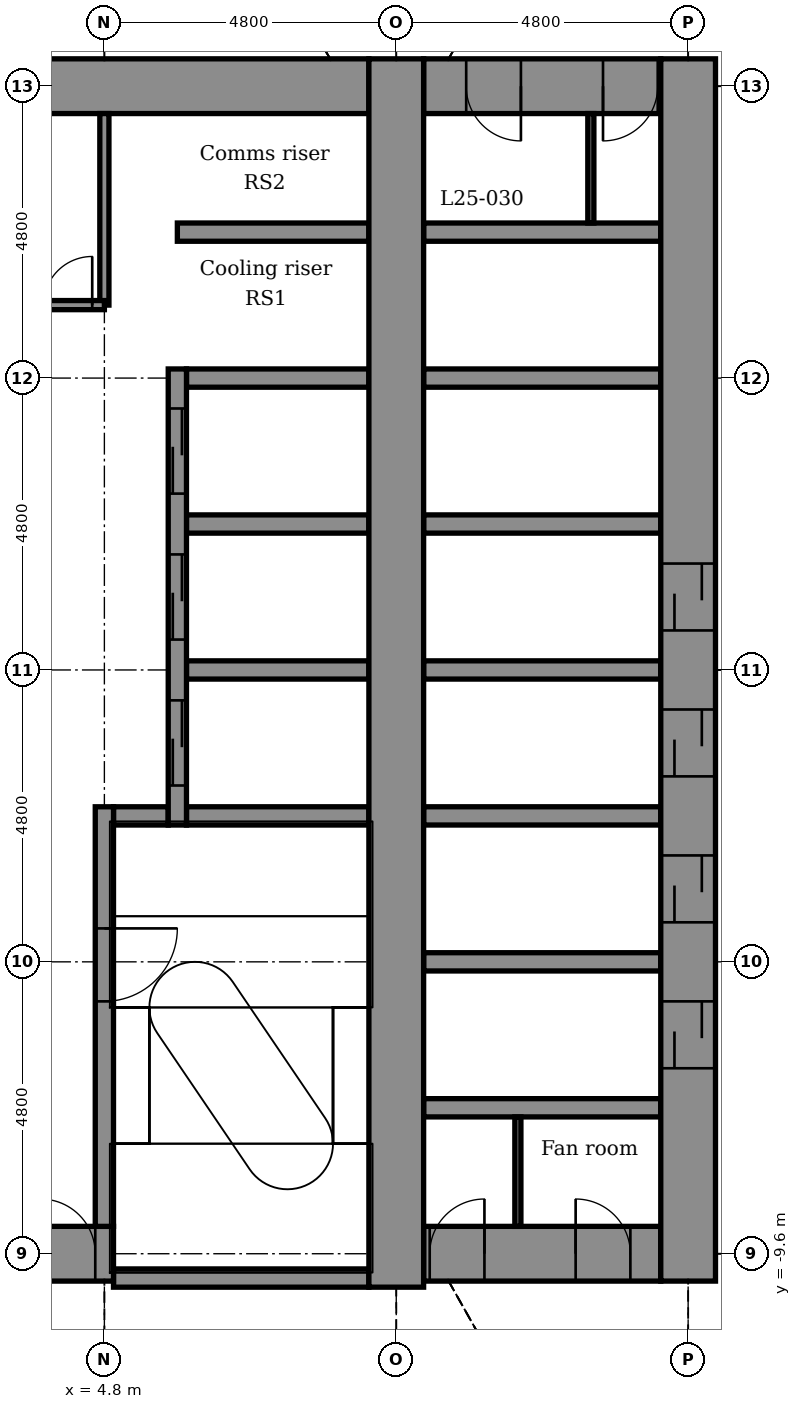
"""IFC4 building model, lengths in metres.
Left out: names, types, materials, properties, quantities, classifications, styles, units other than length and angle.
Written with IfcOpenShell. Run it as: python <this file> out.ifc"""

import sys

from ifc_helpers import new_model, si_unit, direction, frame, frame_2d, origin, place, context, subcontext, project, spatial, rectangle, extrude, element, fill, save


model = new_model("IFC4")
c1 = context("Model", 3, precision=1e-05, world=origin(), true_north=direction((0.0, 1.0)))
c2 = subcontext(c1, "Body", "Model", "MODEL_VIEW")
j1 = project(units=[si_unit("LENGTHUNIT", "METRE"), si_unit("PLANEANGLEUNIT", "RADIAN")], contexts=[c1])
p1 = place(None, origin())
s1 = spatial("IfcSite", under=j1, at=p1, CompositionType="ELEMENT")
p2 = place(p1, origin())
s2 = spatial("IfcBuilding", under=s1, at=p2, CompositionType="ELEMENT")
p3 = place(p2, frame((0.0, 0.0, 127.4)))
s3 = spatial("IfcBuildingStorey", under=s2, at=p3, CompositionType="ELEMENT", Elevation=127.4)
p4 = place(p3, frame((4.95, -10.0, -0.3), z_axis=(0.0, 0.0, 1.0), x_axis=(1.0, 0.0, 0.0)))
e1 = element("IfcWall", 1, at=p4, inside=s3, PredefinedType="STANDARD", context=c2, shape_type="SweptSolid", body=[
    extrude(rectangle(XDim=4.2, YDim=0.3, at=frame_2d((2.1, 0.0))), origin(), (0.0, 0.0, 1.0), 6.15),
])
p5 = place(p3, frame((-5.25, -9.6, -0.3), z_axis=(0.0, 0.0, 1.0), x_axis=(1.0, 0.0, 0.0)))
e2 = element("IfcWall", 2, at=p5, inside=s3, PredefinedType="SHEAR", context=c2, shape_type="SweptSolid", body=[
    extrude(rectangle(XDim=10.2, YDim=0.9, at=frame_2d((5.1, 0.0))), origin(), (0.0, 0.0, 1.0), 6.15),
])
p6 = place(p5, frame((9.0, 0.0, 0.3)))
e3 = element("IfcOpeningElement", 3, at=p6, cuts=e2, PredefinedType="OPENING", context=c2, shape_type="SweptSolid", body=[
    extrude(rectangle(XDim=0.9, YDim=2.1, at=frame_2d((0.45, 1.05))), frame((0.0, 0.46, 0.0), z_axis=(0.0, -1.0, 0.0), x_axis=(1.0, 0.0, 0.0)), (0.0, 0.0, 1.0), 0.92),
])
p7 = place(p3, frame((10.05, -9.6, -0.3), z_axis=(0.0, 0.0, 1.0), x_axis=(1.0, 0.0, 0.0)))
e4 = element("IfcWall", 4, at=p7, inside=s3, PredefinedType="SHEAR", context=c2, shape_type="SweptSolid", body=[
    extrude(rectangle(XDim=3.9, YDim=0.9, at=frame_2d((1.95, 0.0))), origin(), (0.0, 0.0, 1.0), 6.15),
])
p8 = place(p7, frame((0.1, 0.0, 0.3)))
e5 = element("IfcOpeningElement", 5, at=p8, cuts=e4, PredefinedType="OPENING", context=c2, shape_type="SweptSolid", body=[
    extrude(rectangle(XDim=0.9, YDim=2.1, at=frame_2d((0.45, 1.05))), frame((0.0, 0.46, 0.0), z_axis=(0.0, -1.0, 0.0), x_axis=(1.0, 0.0, 0.0)), (0.0, 0.0, 1.0), 0.92),
])
p9 = place(p7, frame((2.5, 0.0, 0.3)))
e6 = element("IfcOpeningElement", 6, at=p9, cuts=e4, PredefinedType="OPENING", context=c2, shape_type="SweptSolid", body=[
    extrude(rectangle(XDim=0.9, YDim=2.1, at=frame_2d((0.45, 1.05))), frame((0.0, 0.46, 0.0), z_axis=(0.0, -1.0, 0.0), x_axis=(1.0, 0.0, 0.0)), (0.0, 0.0, 1.0), 0.92),
])
p10 = place(p3, frame((10.05, -7.2, -0.3), z_axis=(0.0, 0.0, 1.0), x_axis=(1.0, 0.0, 0.0)))
e7 = element("IfcWall", 7, at=p10, inside=s3, PredefinedType="STANDARD", context=c2, shape_type="SweptSolid", body=[
    extrude(rectangle(XDim=3.9, YDim=0.3, at=frame_2d((1.95, 0.0))), origin(), (0.0, 0.0, 1.0), 6.15),
])
p11 = place(p3, frame((10.05, -4.8, -0.3), z_axis=(0.0, 0.0, 1.0), x_axis=(1.0, 0.0, 0.0)))
e8 = element("IfcWall", 8, at=p11, inside=s3, PredefinedType="STANDARD", context=c2, shape_type="SweptSolid", body=[
    extrude(rectangle(XDim=3.9, YDim=0.3, at=frame_2d((1.95, 0.0))), origin(), (0.0, 0.0, 1.0), 4.7),
])
p12 = place(p3, frame((4.95, -2.4, -0.3), z_axis=(0.0, 0.0, 1.0), x_axis=(1.0, 0.0, 0.0)))
e9 = element("IfcWall", 9, at=p12, inside=s3, PredefinedType="STANDARD", context=c2, shape_type="SweptSolid", body=[
    extrude(rectangle(XDim=0.9, YDim=0.3, at=frame_2d((0.45, 0.0))), origin(), (0.0, 0.0, 1.0), 6.15),
])
p13 = place(p3, frame((6.15, -2.4, -0.3), z_axis=(0.0, 0.0, 1.0), x_axis=(1.0, 0.0, 0.0)))
e10 = element("IfcWall", 10, at=p13, inside=s3, PredefinedType="STANDARD", context=c2, shape_type="SweptSolid", body=[
    extrude(rectangle(XDim=3.0, YDim=0.3, at=frame_2d((1.5, 0.0))), origin(), (0.0, 0.0, 1.0), 6.15),
])
p14 = place(p3, frame((10.05, -2.4, -0.3), z_axis=(0.0, 0.0, 1.0), x_axis=(1.0, 0.0, 0.0)))
e11 = element("IfcWall", 11, at=p14, inside=s3, PredefinedType="STANDARD", context=c2, shape_type="SweptSolid", body=[
    extrude(rectangle(XDim=3.9, YDim=0.3, at=frame_2d((1.95, 0.0))), origin(), (0.0, 0.0, 1.0), 4.7),
])
p15 = place(p3, frame((6.15, 0.0, -0.3), z_axis=(0.0, 0.0, 1.0), x_axis=(1.0, 0.0, 0.0)))
e12 = element("IfcWall", 12, at=p15, inside=s3, PredefinedType="STANDARD", context=c2, shape_type="SweptSolid", body=[
    extrude(rectangle(XDim=3.0, YDim=0.3, at=frame_2d((1.5, 0.0))), origin(), (0.0, 0.0, 1.0), 6.15),
])
p16 = place(p3, frame((10.05, 0.0, -0.3), z_axis=(0.0, 0.0, 1.0), x_axis=(1.0, 0.0, 0.0)))
e13 = element("IfcWall", 13, at=p16, inside=s3, PredefinedType="STANDARD", context=c2, shape_type="SweptSolid", body=[
    extrude(rectangle(XDim=3.9, YDim=0.3, at=frame_2d((1.95, 0.0))), origin(), (0.0, 0.0, 1.0), 4.7),
])
p17 = place(p3, frame((6.15, 2.4, -0.3), z_axis=(0.0, 0.0, 1.0), x_axis=(1.0, 0.0, 0.0)))
e14 = element("IfcWall", 14, at=p17, inside=s3, PredefinedType="STANDARD", context=c2, shape_type="SweptSolid", body=[
    extrude(rectangle(XDim=3.0, YDim=0.3, at=frame_2d((1.5, 0.0))), origin(), (0.0, 0.0, 1.0), 6.15),
])
p18 = place(p3, frame((10.05, 2.4, -0.3), z_axis=(0.0, 0.0, 1.0), x_axis=(1.0, 0.0, 0.0)))
e15 = element("IfcWall", 15, at=p18, inside=s3, PredefinedType="STANDARD", context=c2, shape_type="SweptSolid", body=[
    extrude(rectangle(XDim=3.9, YDim=0.3, at=frame_2d((1.95, 0.0))), origin(), (0.0, 0.0, 1.0), 6.15),
])
p19 = place(p3, frame((6.15, 4.8, -0.3), z_axis=(0.0, 0.0, 1.0), x_axis=(1.0, 0.0, 0.0)))
e16 = element("IfcWall", 16, at=p19, inside=s3, PredefinedType="STANDARD", context=c2, shape_type="SweptSolid", body=[
    extrude(rectangle(XDim=3.0, YDim=0.3, at=frame_2d((1.5, 0.0))), origin(), (0.0, 0.0, 1.0), 6.15),
])
p20 = place(p3, frame((10.05, 4.8, -0.3), z_axis=(0.0, 0.0, 1.0), x_axis=(1.0, 0.0, 0.0)))
e17 = element("IfcWall", 17, at=p20, inside=s3, PredefinedType="STANDARD", context=c2, shape_type="SweptSolid", body=[
    extrude(rectangle(XDim=3.9, YDim=0.3, at=frame_2d((1.95, 0.0))), origin(), (0.0, 0.0, 1.0), 6.15),
])
p21 = place(p3, frame((6.0, 7.2, -0.3), z_axis=(0.0, 0.0, 1.0), x_axis=(1.0, 0.0, 0.0)))
e18 = element("IfcWall", 18, at=p21, inside=s3, PredefinedType="STANDARD", context=c2, shape_type="SweptSolid", body=[
    extrude(rectangle(XDim=3.15, YDim=0.3, at=frame_2d((1.575, 0.0))), origin(), (0.0, 0.0, 1.0), 6.15),
])
p22 = place(p3, frame((10.05, 7.2, -0.3), z_axis=(0.0, 0.0, 1.0), x_axis=(1.0, 0.0, 0.0)))
e19 = element("IfcWall", 19, at=p22, inside=s3, PredefinedType="STANDARD", context=c2, shape_type="SweptSolid", body=[
    extrude(rectangle(XDim=3.9, YDim=0.3, at=frame_2d((1.95, 0.0))), origin(), (0.0, 0.0, 1.0), 6.15),
])
p23 = place(p3, frame((-5.25, 9.6, -0.3), z_axis=(0.0, 0.0, 1.0), x_axis=(1.0, 0.0, 0.0)))
e20 = element("IfcWall", 20, at=p23, inside=s3, PredefinedType="SHEAR", context=c2, shape_type="SweptSolid", body=[
    extrude(rectangle(XDim=14.4, YDim=0.9, at=frame_2d((7.2, 0.0))), origin(), (0.0, 0.0, 1.0), 6.15),
])
p24 = place(p23, frame((0.6, 0.0, 0.3)))
e21 = element("IfcOpeningElement", 21, at=p24, cuts=e20, PredefinedType="OPENING", context=c2, shape_type="SweptSolid", body=[
    extrude(rectangle(XDim=0.9, YDim=2.1, at=frame_2d((0.45, 1.05))), frame((0.0, 0.46, 0.0), z_axis=(0.0, -1.0, 0.0), x_axis=(1.0, 0.0, 0.0)), (0.0, 0.0, 1.0), 0.92),
])
p25 = place(p3, frame((10.05, 9.6, -0.3), z_axis=(0.0, 0.0, 1.0), x_axis=(1.0, 0.0, 0.0)))
e22 = element("IfcWall", 22, at=p25, inside=s3, PredefinedType="SHEAR", context=c2, shape_type="SweptSolid", body=[
    extrude(rectangle(XDim=3.9, YDim=0.9, at=frame_2d((1.95, 0.0))), origin(), (0.0, 0.0, 1.0), 6.15),
])
p26 = place(p25, frame((0.7, 0.0, 0.3)))
e23 = element("IfcOpeningElement", 23, at=p26, cuts=e22, PredefinedType="OPENING", context=c2, shape_type="SweptSolid", body=[
    extrude(rectangle(XDim=0.9, YDim=2.1, at=frame_2d((0.45, 1.05))), frame((0.0, 0.46, 0.0), z_axis=(0.0, -1.0, 0.0), x_axis=(1.0, 0.0, 0.0)), (0.0, 0.0, 1.0), 0.92),
])
p27 = place(p25, frame((2.95, 0.0, 0.3)))
e24 = element("IfcOpeningElement", 24, at=p27, cuts=e22, PredefinedType="OPENING", context=c2, shape_type="SweptSolid", body=[
    extrude(rectangle(XDim=0.9, YDim=2.1, at=frame_2d((0.45, 1.05))), frame((0.0, 0.46, 0.0), z_axis=(0.0, -1.0, 0.0), x_axis=(1.0, 0.0, 0.0)), (0.0, 0.0, 1.0), 0.92),
])
p28 = place(p3, frame((4.8, -9.15, -0.3), z_axis=(0.0, 0.0, 1.0), x_axis=(0.0, 1.0, 0.0)))
e25 = element("IfcWall", 25, at=p28, inside=s3, PredefinedType="STANDARD", context=c2, shape_type="SweptSolid", body=[
    extrude(rectangle(XDim=6.9, YDim=0.3, at=frame_2d((3.45, 0.0))), origin(), (0.0, 0.0, 1.0), 6.15),
])
p29 = place(p28, frame((3.7, 0.0, 0.3)))
e26 = element("IfcOpeningElement", 26, at=p29, cuts=e25, PredefinedType="OPENING", context=c2, shape_type="SweptSolid", body=[
    extrude(rectangle(XDim=1.2, YDim=2.1, at=frame_2d((0.6, 1.05))), frame((0.0, 0.16, 0.0), z_axis=(0.0, -1.0, 0.0), x_axis=(1.0, 0.0, 0.0)), (0.0, 0.0, 1.0), 0.32),
])
p30 = place(p3, frame((6.0, -2.55, -0.3), z_axis=(0.0, 0.0, 1.0), x_axis=(0.0, 1.0, 0.0)))
e27 = element("IfcWall", 27, at=p30, inside=s3, PredefinedType="STANDARD", context=c2, shape_type="SweptSolid", body=[
    extrude(rectangle(XDim=7.5, YDim=0.3, at=frame_2d((3.75, 0.0))), origin(), (0.0, 0.0, 1.0), 6.15),
])
p31 = place(p30, frame((0.65, 0.0, 0.3)))
e28 = element("IfcOpeningElement", 28, at=p31, cuts=e27, PredefinedType="OPENING", context=c2, shape_type="SweptSolid", body=[
    extrude(rectangle(XDim=1.4, YDim=2.1, at=frame_2d((0.7, 1.05))), frame((0.0, 0.16, 0.0), z_axis=(0.0, -1.0, 0.0), x_axis=(1.0, 0.0, 0.0)), (0.0, 0.0, 1.0), 0.32),
])
p32 = place(p30, frame((3.05, 0.0, 0.3)))
e29 = element("IfcOpeningElement", 29, at=p32, cuts=e27, PredefinedType="OPENING", context=c2, shape_type="SweptSolid", body=[
    extrude(rectangle(XDim=1.4, YDim=2.1, at=frame_2d((0.7, 1.05))), frame((0.0, 0.16, 0.0), z_axis=(0.0, -1.0, 0.0), x_axis=(1.0, 0.0, 0.0)), (0.0, 0.0, 1.0), 0.32),
])
p33 = place(p30, frame((5.45, 0.0, 0.3)))
e30 = element("IfcOpeningElement", 30, at=p33, cuts=e27, PredefinedType="OPENING", context=c2, shape_type="SweptSolid", body=[
    extrude(rectangle(XDim=1.4, YDim=2.1, at=frame_2d((0.7, 1.05))), frame((0.0, 0.16, 0.0), z_axis=(0.0, -1.0, 0.0), x_axis=(1.0, 0.0, 0.0)), (0.0, 0.0, 1.0), 0.32),
])
p34 = place(p3, frame((9.6, -10.15, -0.3), z_axis=(0.0, 0.0, 1.0), x_axis=(0.0, 1.0, 0.0)))
e31 = element("IfcWall", 31, at=p34, inside=s3, PredefinedType="SHEAR", context=c2, shape_type="SweptSolid", body=[
    extrude(rectangle(XDim=20.2, YDim=0.9, at=frame_2d((10.1, 0.0))), origin(), (0.0, 0.0, 1.0), 6.15),
])
p35 = place(p3, frame((14.4, -10.05, -0.3), z_axis=(0.0, 0.0, 1.0), x_axis=(0.0, 1.0, 0.0)))
e32 = element("IfcWall", 32, at=p35, inside=s3, PredefinedType="SHEAR", context=c2, shape_type="SweptSolid", body=[
    extrude(rectangle(XDim=20.1, YDim=0.9, at=frame_2d((10.05, 0.0))), origin(), (0.0, 0.0, 1.0), 6.15),
])
p36 = place(p35, frame((3.5, 0.0, 0.3)))
e33 = element("IfcOpeningElement", 33, at=p36, cuts=e32, PredefinedType="OPENING", context=c2, shape_type="SweptSolid", body=[
    extrude(rectangle(XDim=1.1, YDim=2.1, at=frame_2d((0.55, 1.05))), frame((0.0, 0.46, 0.0), z_axis=(0.0, -1.0, 0.0), x_axis=(1.0, 0.0, 0.0)), (0.0, 0.0, 1.0), 0.92),
])
p37 = place(p35, frame((5.9, 0.0, 0.3)))
e34 = element("IfcOpeningElement", 34, at=p37, cuts=e32, PredefinedType="OPENING", context=c2, shape_type="SweptSolid", body=[
    extrude(rectangle(XDim=1.1, YDim=2.1, at=frame_2d((0.55, 1.05))), frame((0.0, 0.46, 0.0), z_axis=(0.0, -1.0, 0.0), x_axis=(1.0, 0.0, 0.0)), (0.0, 0.0, 1.0), 0.92),
])
p38 = place(p35, frame((8.3, 0.0, 0.3)))
e35 = element("IfcOpeningElement", 35, at=p38, cuts=e32, PredefinedType="OPENING", context=c2, shape_type="SweptSolid", body=[
    extrude(rectangle(XDim=1.1, YDim=2.1, at=frame_2d((0.55, 1.05))), frame((0.0, 0.46, 0.0), z_axis=(0.0, -1.0, 0.0), x_axis=(1.0, 0.0, 0.0)), (0.0, 0.0, 1.0), 0.92),
])
p39 = place(p35, frame((10.7, 0.0, 0.3)))
e36 = element("IfcOpeningElement", 36, at=p39, cuts=e32, PredefinedType="OPENING", context=c2, shape_type="SweptSolid", body=[
    extrude(rectangle(XDim=1.1, YDim=2.1, at=frame_2d((0.55, 1.05))), frame((0.0, 0.46, 0.0), z_axis=(0.0, -1.0, 0.0), x_axis=(1.0, 0.0, 0.0)), (0.0, 0.0, 1.0), 0.92),
])
for number, where, z_axis, x_axis in (
    (37, (12.8, 7.35, 0.0), (0.0, 0.0, 1.0), (0.0, 1.0, 0.0)),
    (38, (11.6, -9.15, 0.0), (0.0, 0.0, 1.0), (0.0, 1.0, 0.0)),
):
    element("IfcWall", number, at=place(p3, frame(where, z_axis=z_axis, x_axis=x_axis)), inside=s3, PredefinedType="PARTITIONING", context=c2, shape_type="SweptSolid", body=[
        extrude(rectangle(XDim=1.8, YDim=0.1, at=frame_2d((0.9, 0.0))), origin(), (0.0, 0.0, 1.0), 5.85),
    ])
p40 = place(p3, frame((4.8, 6.0, 0.0), z_axis=(0.0, 0.0, 1.0), x_axis=(0.0, 1.0, 0.0)))
e39 = element("IfcWall", 39, at=p40, inside=s3, PredefinedType="PARTITIONING", context=c2, shape_type="SweptSolid", body=[
    extrude(rectangle(XDim=3.15, YDim=0.15, at=frame_2d((1.575, 0.0))), origin(), (0.0, 0.0, 1.0), 5.85),
])
p41 = place(p3, frame((3.75, 6.0, 0.0), z_axis=(0.0, 0.0, 1.0), x_axis=(1.0, 0.0, 0.0)))
e40 = element("IfcWall", 40, at=p41, inside=s3, PredefinedType="PARTITIONING", context=c2, shape_type="SweptSolid", body=[
    extrude(rectangle(XDim=1.05, YDim=0.15, at=frame_2d((0.525, 0.0))), origin(), (0.0, 0.0, 1.0), 5.85),
])
p42 = place(p41, frame((0.05, 0.0, 0.0)))
e41 = element("IfcOpeningElement", 41, at=p42, cuts=e40, PredefinedType="OPENING", context=c2, shape_type="SweptSolid", body=[
    extrude(rectangle(XDim=0.8, YDim=2.1, at=frame_2d((0.4, 1.05))), frame((0.0, 0.085, 0.0), z_axis=(0.0, -1.0, 0.0), x_axis=(1.0, 0.0, 0.0)), (0.0, 0.0, 1.0), 0.17),
])
p43 = place(p42, origin())
e42 = element("IfcDoor", 42, at=p43, inside=s3, OperationType="SINGLE_SWING_RIGHT", PredefinedType="DOOR", context=c2, shape_type="SweptSolid", body=[
    extrude(rectangle(XDim=0.8, YDim=2.1, at=frame_2d((0.4, 1.05))), frame((0.0, 0.025, 0.0), z_axis=(0.0, -1.0, 0.0), x_axis=(1.0, 0.0, 0.0)), (0.0, 0.0, 1.0), 0.05),
])
fill(e41, e42)
p44 = place(p31, origin())
e43 = element("IfcDoor", 43, at=p44, inside=s3, OperationType="DOUBLE_DOOR_SLIDING", PredefinedType="DOOR", context=c2, shape_type="SweptSolid", body=[
    extrude(rectangle(XDim=1.4, YDim=2.1, at=frame_2d((0.7, 1.05))), frame((0.0, 0.025, 0.0), z_axis=(0.0, -1.0, 0.0), x_axis=(1.0, 0.0, 0.0)), (0.0, 0.0, 1.0), 0.05),
])
fill(e28, e43)
p45 = place(p32, origin())
e44 = element("IfcDoor", 44, at=p45, inside=s3, OperationType="DOUBLE_DOOR_SLIDING", PredefinedType="DOOR", context=c2, shape_type="SweptSolid", body=[
    extrude(rectangle(XDim=1.4, YDim=2.1, at=frame_2d((0.7, 1.05))), frame((0.0, 0.025, 0.0), z_axis=(0.0, -1.0, 0.0), x_axis=(1.0, 0.0, 0.0)), (0.0, 0.0, 1.0), 0.05),
])
fill(e29, e44)
p46 = place(p33, origin())
e45 = element("IfcDoor", 45, at=p46, inside=s3, OperationType="DOUBLE_DOOR_SLIDING", PredefinedType="DOOR", context=c2, shape_type="SweptSolid", body=[
    extrude(rectangle(XDim=1.4, YDim=2.1, at=frame_2d((0.7, 1.05))), frame((0.0, 0.025, 0.0), z_axis=(0.0, -1.0, 0.0), x_axis=(1.0, 0.0, 0.0)), (0.0, 0.0, 1.0), 0.05),
])
fill(e30, e45)
p47 = place(p36, origin())
e46 = element("IfcDoor", 46, at=p47, inside=s3, OperationType="DOUBLE_DOOR_SLIDING", PredefinedType="DOOR", context=c2, shape_type="SweptSolid", body=[
    extrude(rectangle(XDim=1.1, YDim=2.1, at=frame_2d((0.55, 1.05))), frame((0.0, 0.025, 0.0), z_axis=(0.0, -1.0, 0.0), x_axis=(1.0, 0.0, 0.0)), (0.0, 0.0, 1.0), 0.05),
])
fill(e33, e46)
p48 = place(p37, origin())
e47 = element("IfcDoor", 47, at=p48, inside=s3, OperationType="DOUBLE_DOOR_SLIDING", PredefinedType="DOOR", context=c2, shape_type="SweptSolid", body=[
    extrude(rectangle(XDim=1.1, YDim=2.1, at=frame_2d((0.55, 1.05))), frame((0.0, 0.025, 0.0), z_axis=(0.0, -1.0, 0.0), x_axis=(1.0, 0.0, 0.0)), (0.0, 0.0, 1.0), 0.05),
])
fill(e34, e47)
p49 = place(p38, origin())
e48 = element("IfcDoor", 48, at=p49, inside=s3, OperationType="DOUBLE_DOOR_SLIDING", PredefinedType="DOOR", context=c2, shape_type="SweptSolid", body=[
    extrude(rectangle(XDim=1.1, YDim=2.1, at=frame_2d((0.55, 1.05))), frame((0.0, 0.025, 0.0), z_axis=(0.0, -1.0, 0.0), x_axis=(1.0, 0.0, 0.0)), (0.0, 0.0, 1.0), 0.05),
])
fill(e35, e48)
p50 = place(p39, origin())
e49 = element("IfcDoor", 49, at=p50, inside=s3, OperationType="DOUBLE_DOOR_SLIDING", PredefinedType="DOOR", context=c2, shape_type="SweptSolid", body=[
    extrude(rectangle(XDim=1.1, YDim=2.1, at=frame_2d((0.55, 1.05))), frame((0.0, 0.025, 0.0), z_axis=(0.0, -1.0, 0.0), x_axis=(1.0, 0.0, 0.0)), (0.0, 0.0, 1.0), 0.05),
])
fill(e36, e49)
p51 = place(p29, frame((1.2, 0.0, 0.0), z_axis=(0.0, 0.0, 1.0), x_axis=(-1.0, 0.0, 0.0)))
e50 = element("IfcDoor", 50, at=p51, inside=s3, OperationType="SINGLE_SWING_RIGHT", PredefinedType="DOOR", context=c2, shape_type="SweptSolid", body=[
    extrude(rectangle(XDim=1.2, YDim=2.1, at=frame_2d((0.6, 1.05))), frame((0.0, 0.025, 0.0), z_axis=(0.0, -1.0, 0.0), x_axis=(1.0, 0.0, 0.0)), (0.0, 0.0, 1.0), 0.05),
])
fill(e26, e50)
p52 = place(p8, origin())
e51 = element("IfcDoor", 51, at=p52, inside=s3, OperationType="SINGLE_SWING_RIGHT", PredefinedType="DOOR", context=c2, shape_type="SweptSolid", body=[
    extrude(rectangle(XDim=0.9, YDim=2.1, at=frame_2d((0.45, 1.05))), frame((0.0, 0.025, 0.0), z_axis=(0.0, -1.0, 0.0), x_axis=(1.0, 0.0, 0.0)), (0.0, 0.0, 1.0), 0.05),
])
fill(e5, e51)
p53 = place(p9, origin())
e52 = element("IfcDoor", 52, at=p53, inside=s3, OperationType="SINGLE_SWING_LEFT", PredefinedType="DOOR", context=c2, shape_type="SweptSolid", body=[
    extrude(rectangle(XDim=0.9, YDim=2.1, at=frame_2d((0.45, 1.05))), frame((0.0, 0.025, 0.0), z_axis=(0.0, -1.0, 0.0), x_axis=(1.0, 0.0, 0.0)), (0.0, 0.0, 1.0), 0.05),
])
fill(e6, e52)
p54 = place(p26, frame((0.9, 0.0, 0.0), z_axis=(0.0, 0.0, 1.0), x_axis=(-1.0, 0.0, 0.0)))
e53 = element("IfcDoor", 53, at=p54, inside=s3, OperationType="SINGLE_SWING_RIGHT", PredefinedType="DOOR", context=c2, shape_type="SweptSolid", body=[
    extrude(rectangle(XDim=0.9, YDim=2.1, at=frame_2d((0.45, 1.05))), frame((0.0, 0.025, 0.0), z_axis=(0.0, -1.0, 0.0), x_axis=(1.0, 0.0, 0.0)), (0.0, 0.0, 1.0), 0.05),
])
fill(e23, e53)
p55 = place(p27, frame((0.9, 0.0, 0.0), z_axis=(0.0, 0.0, 1.0), x_axis=(-1.0, 0.0, 0.0)))
e54 = element("IfcDoor", 54, at=p55, inside=s3, OperationType="SINGLE_SWING_LEFT", PredefinedType="DOOR", context=c2, shape_type="SweptSolid", body=[
    extrude(rectangle(XDim=0.9, YDim=2.1, at=frame_2d((0.45, 1.05))), frame((0.0, 0.025, 0.0), z_axis=(0.0, -1.0, 0.0), x_axis=(1.0, 0.0, 0.0)), (0.0, 0.0, 1.0), 0.05),
])
fill(e24, e54)
p56 = place(p6, origin())
e55 = element("IfcDoor", 55, at=p56, inside=s3, OperationType="SINGLE_SWING_LEFT", PredefinedType="DOOR", context=c2, shape_type="SweptSolid", body=[
    extrude(rectangle(XDim=0.9, YDim=2.1, at=frame_2d((0.45, 1.05))), frame((0.0, 0.025, 0.0), z_axis=(0.0, -1.0, 0.0), x_axis=(1.0, 0.0, 0.0)), (0.0, 0.0, 1.0), 0.05),
])
fill(e3, e55)
save(model, sys.argv[1])
